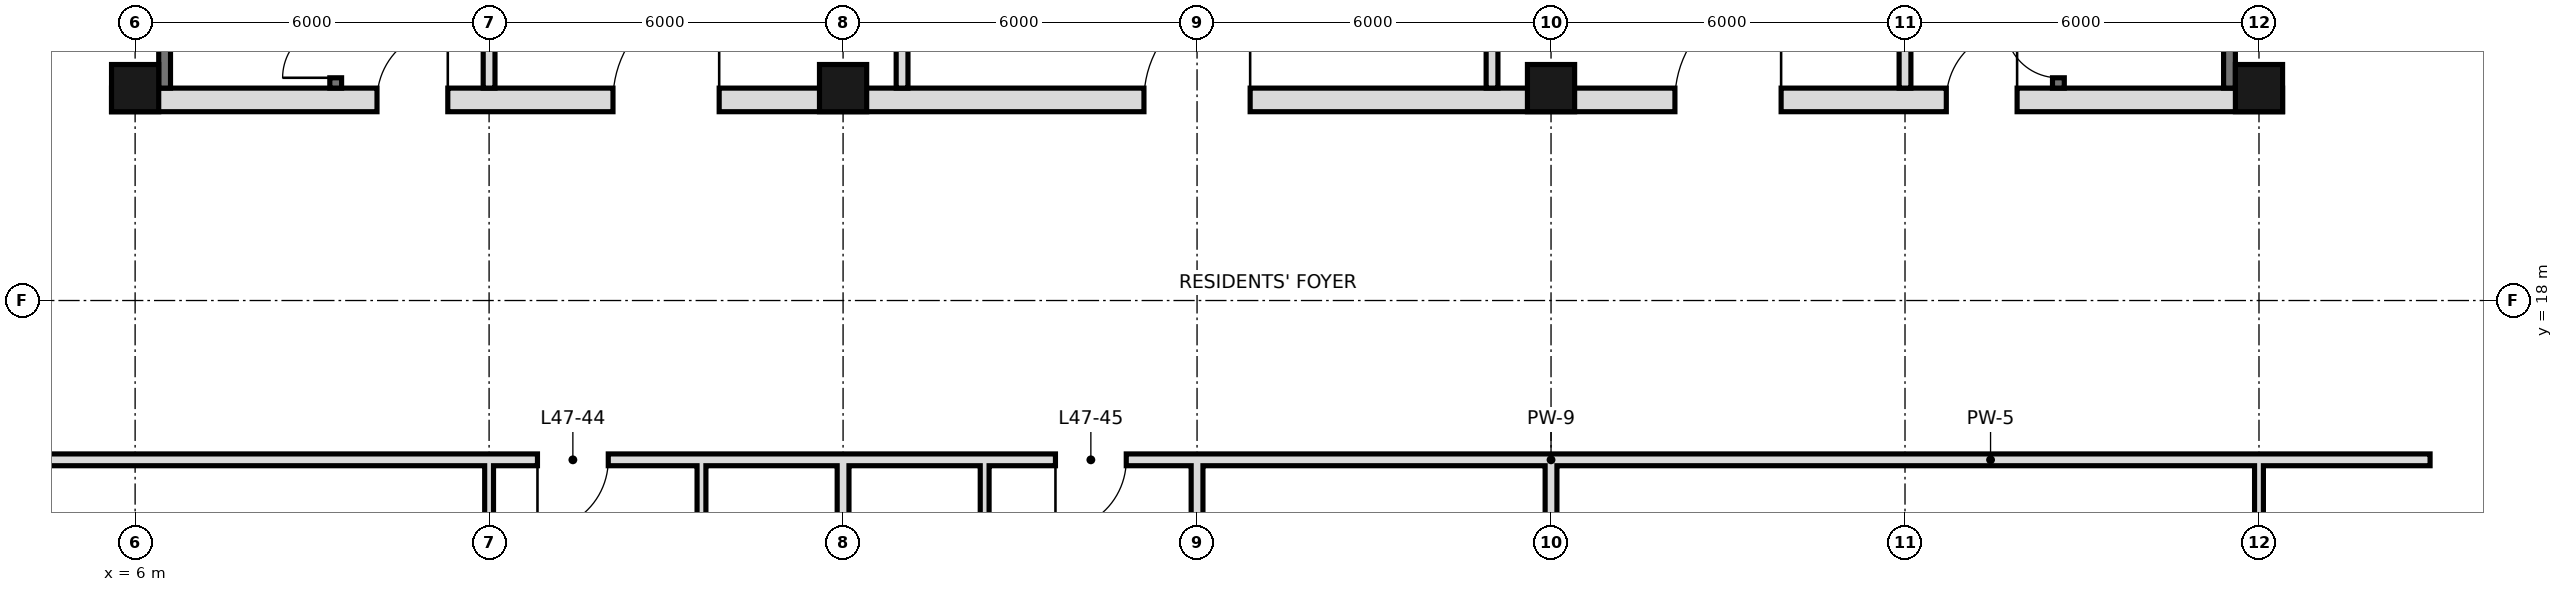
"""IFC4 building model, lengths in metres.
Left out: names, types, materials, properties, quantities, classifications, styles, units other than length and angle.
Written with IfcOpenShell. Run it as: python <this file> out.ifc"""

import sys

from ifc_helpers import new_model, si_unit, direction, frame, frame_2d, origin, origin_2d, place, context, subcontext, project, spatial, rectangle, hollow_rectangle, extrude, element, fill, save


model = new_model("IFC4")
c1 = context("Model", 3, precision=1e-05, world=origin(), true_north=direction((0.0, 1.0)))
c2 = subcontext(c1, "Body", "Model", "MODEL_VIEW")
j1 = project(units=[si_unit("LENGTHUNIT", "METRE"), si_unit("PLANEANGLEUNIT", "RADIAN")], contexts=[c1])
p1 = place(None, origin())
s1 = spatial("IfcSite", under=j1, at=p1, CompositionType="ELEMENT")
p2 = place(p1, origin())
s2 = spatial("IfcBuilding", under=s1, at=p2, CompositionType="ELEMENT")
p3 = place(p2, frame((0.0, 0.0, 202.8)))
s3 = spatial("IfcBuildingStorey", under=s2, at=p3, CompositionType="ELEMENT", Elevation=202.8)
for number, where, z_axis, x_axis in (
    (1, (6.0, 21.6, 0.0), (0.0, 0.0, 1.0), (1.0, 0.0, 0.0)),
    (2, (18.0, 21.6, 0.0), (0.0, 0.0, 1.0), (1.0, 0.0, 0.0)),
    (3, (30.0, 21.6, 0.0), (0.0, 0.0, 1.0), (1.0, 0.0, 0.0)),
    (4, (42.0, 21.6, 0.0), (0.0, 0.0, 1.0), (1.0, 0.0, 0.0)),
):
    element("IfcColumn", number, at=place(p3, frame(where, z_axis=z_axis, x_axis=x_axis)), inside=s3, PredefinedType="COLUMN", context=c2, shape_type="SweptSolid", body=[
        extrude(hollow_rectangle(XDim=0.8, YDim=0.8, WallThickness=0.04, at=origin_2d()), origin(), (0.0, 0.0, 1.0), 3.6),
    ])
p4 = place(p3, frame((12.0, 10.8, 0.0), z_axis=(0.0, 0.0, 1.0), x_axis=(0.0, 1.0, 0.0)))
e5 = element("IfcWall", 5, at=p4, inside=s3, PredefinedType="PARTITIONING", context=c2, shape_type="SweptSolid", body=[
    extrude(rectangle(XDim=4.5, YDim=0.15, at=frame_2d((2.25, 0.0))), origin(), (0.0, 0.0, 1.0), 2.72),
])
p5 = place(p3, frame((15.6, 10.8, 0.0), z_axis=(0.0, 0.0, 1.0), x_axis=(0.0, 1.0, 0.0)))
e6 = element("IfcWall", 6, at=p5, inside=s3, PredefinedType="PARTITIONING", context=c2, shape_type="SweptSolid", body=[
    extrude(rectangle(XDim=4.5, YDim=0.15, at=frame_2d((2.25, 0.0))), origin(), (0.0, 0.0, 1.0), 3.42),
])
p6 = place(p3, frame((18.0, -0.6, 0.0), z_axis=(0.0, 0.0, 1.0), x_axis=(0.0, 1.0, 0.0)))
e7 = element("IfcWall", 7, at=p6, inside=s3, PredefinedType="SOLIDWALL", context=c2, shape_type="SweptSolid", body=[
    extrude(rectangle(XDim=15.9, YDim=0.2, at=frame_2d((7.95, 0.0))), origin(), (0.0, 0.0, 1.0), 2.72),
])
p7 = place(p3, frame((20.4, 10.8, 0.0), z_axis=(0.0, 0.0, 1.0), x_axis=(0.0, 1.0, 0.0)))
e8 = element("IfcWall", 8, at=p7, inside=s3, PredefinedType="PARTITIONING", context=c2, shape_type="SweptSolid", body=[
    extrude(rectangle(XDim=4.5, YDim=0.15, at=frame_2d((2.25, 0.0))), origin(), (0.0, 0.0, 1.0), 3.42),
])
for number, where, z_axis, x_axis in (
    (9, (24.0, 10.8, 0.0), (0.0, 0.0, 1.0), (0.0, 1.0, 0.0)),
    (10, (30.0, 10.8, 0.0), (0.0, 0.0, 1.0), (0.0, 1.0, 0.0)),
):
    element("IfcWall", number, at=place(p3, frame(where, z_axis=z_axis, x_axis=x_axis)), inside=s3, PredefinedType="SOLIDWALL", context=c2, shape_type="SweptSolid", body=[
        extrude(rectangle(XDim=4.5, YDim=0.2, at=frame_2d((2.25, 0.0))), origin(), (0.0, 0.0, 1.0), 2.72),
    ])
p8 = place(p3, frame((42.0, 10.8, 0.0), z_axis=(0.0, 0.0, 1.0), x_axis=(0.0, 1.0, 0.0)))
e11 = element("IfcWall", 11, at=p8, inside=s3, PredefinedType="PARTITIONING", context=c2, shape_type="SweptSolid", body=[
    extrude(rectangle(XDim=4.5, YDim=0.15, at=frame_2d((2.25, 0.0))), origin(), (0.0, 0.0, 1.0), 2.72),
])
p9 = place(p3, frame((3.1, 15.3, 0.0), z_axis=(0.0, 0.0, 1.0), x_axis=(1.0, 0.0, 0.0)))
e12 = element("IfcWall", 12, at=p9, inside=s3, PredefinedType="SOLIDWALL", context=c2, shape_type="SweptSolid", body=[
    extrude(rectangle(XDim=20.9, YDim=0.2, at=frame_2d((10.45, 0.0))), origin(), (0.0, 0.0, 1.0), 2.72),
])
p10 = place(p9, frame((9.72, 0.0, 0.0)))
e13 = element("IfcOpeningElement", 13, at=p10, cuts=e12, PredefinedType="OPENING", context=c2, shape_type="SweptSolid", body=[
    extrude(rectangle(XDim=1.2, YDim=2.4, at=frame_2d((0.6, 1.2))), frame((0.0, 0.11, 0.0), z_axis=(0.0, -1.0, 0.0), x_axis=(1.0, 0.0, 0.0)), (0.0, 0.0, 1.0), 0.22),
])
p11 = place(p9, frame((18.5, 0.0, 0.0)))
e14 = element("IfcOpeningElement", 14, at=p11, cuts=e12, PredefinedType="OPENING", context=c2, shape_type="SweptSolid", body=[
    extrude(rectangle(XDim=1.2, YDim=2.4, at=frame_2d((0.6, 1.2))), frame((0.0, 0.11, 0.0), z_axis=(0.0, -1.0, 0.0), x_axis=(1.0, 0.0, 0.0)), (0.0, 0.0, 1.0), 0.22),
])
p12 = place(p3, frame((30.0, 15.3, 0.0), z_axis=(0.0, 0.0, 1.0), x_axis=(1.0, 0.0, 0.0)))
e15 = element("IfcWall", 15, at=p12, inside=s3, PredefinedType="SOLIDWALL", context=c2, shape_type="SweptSolid", body=[
    extrude(rectangle(XDim=14.9, YDim=0.2, at=frame_2d((7.45, 0.0))), origin(), (0.0, 0.0, 1.0), 2.72),
])
p13 = place(p3, frame((24.0, 15.3, 0.0), z_axis=(0.0, 0.0, 1.0), x_axis=(1.0, 0.0, 0.0)))
e16 = element("IfcWall", 16, at=p13, inside=s3, PredefinedType="SOLIDWALL", context=c2, shape_type="SweptSolid", body=[
    extrude(rectangle(XDim=6.0, YDim=0.2, at=frame_2d((3.0, 0.0))), origin(), (0.0, 0.0, 1.0), 2.72),
])
for number, where, z_axis, x_axis in (
    (17, (6.5, 21.6, 0.0), (0.0, 0.0, 1.0), (0.0, 1.0, 0.0)),
    (18, (41.5, 21.6, 0.0), (0.0, 0.0, 1.0), (0.0, 1.0, 0.0)),
):
    element("IfcWall", number, at=place(p3, frame(where, z_axis=z_axis, x_axis=x_axis)), inside=s3, PredefinedType="SOLIDWALL", context=c2, shape_type="SweptSolid", body=[
        extrude(rectangle(XDim=23.5, YDim=0.2, at=frame_2d((11.75, 0.0))), origin(), (0.0, 0.0, 1.0), 3.42),
    ])
p14 = place(p3, frame((5.6, 21.4, 0.0), z_axis=(0.0, 0.0, 1.0), x_axis=(1.0, 0.0, 0.0)))
e19 = element("IfcWall", 19, at=p14, inside=s3, PredefinedType="SOLIDWALL", context=c2, shape_type="SweptSolid", body=[
    extrude(rectangle(XDim=36.8, YDim=0.4, at=frame_2d((18.4, 0.0))), origin(), (0.0, 0.0, 1.0), 3.42),
])
p15 = place(p14, frame((8.5, 0.0, 0.0)))
e20 = element("IfcOpeningElement", 20, at=p15, cuts=e19, PredefinedType="OPENING", context=c2, shape_type="SweptSolid", body=[
    extrude(rectangle(XDim=1.8, YDim=2.1, at=frame_2d((0.9, 1.05))), frame((0.0, 0.21, 0.0), z_axis=(0.0, -1.0, 0.0), x_axis=(1.0, 0.0, 0.0)), (0.0, 0.0, 1.0), 0.42),
])
p16 = place(p14, frame((17.5, 0.0, 0.0)))
e21 = element("IfcOpeningElement", 21, at=p16, cuts=e19, PredefinedType="OPENING", context=c2, shape_type="SweptSolid", body=[
    extrude(rectangle(XDim=1.8, YDim=2.1, at=frame_2d((0.9, 1.05))), frame((0.0, 0.21, 0.0), z_axis=(0.0, -1.0, 0.0), x_axis=(1.0, 0.0, 0.0)), (0.0, 0.0, 1.0), 0.42),
])
p17 = place(p14, frame((26.5, 0.0, 0.0)))
e22 = element("IfcOpeningElement", 22, at=p17, cuts=e19, PredefinedType="OPENING", context=c2, shape_type="SweptSolid", body=[
    extrude(rectangle(XDim=1.8, YDim=2.1, at=frame_2d((0.9, 1.05))), frame((0.0, 0.21, 0.0), z_axis=(0.0, -1.0, 0.0), x_axis=(1.0, 0.0, 0.0)), (0.0, 0.0, 1.0), 0.42),
])
p18 = place(p14, frame((4.5, 0.0, 0.0)))
e23 = element("IfcOpeningElement", 23, at=p18, cuts=e19, PredefinedType="OPENING", context=c2, shape_type="SweptSolid", body=[
    extrude(rectangle(XDim=1.2, YDim=2.1, at=frame_2d((0.6, 1.05))), frame((0.0, 0.21, 0.0), z_axis=(0.0, -1.0, 0.0), x_axis=(1.0, 0.0, 0.0)), (0.0, 0.0, 1.0), 0.42),
])
p19 = place(p14, frame((31.1, 0.0, 0.0)))
e24 = element("IfcOpeningElement", 24, at=p19, cuts=e19, PredefinedType="OPENING", context=c2, shape_type="SweptSolid", body=[
    extrude(rectangle(XDim=1.2, YDim=2.1, at=frame_2d((0.6, 1.05))), frame((0.0, 0.21, 0.0), z_axis=(0.0, -1.0, 0.0), x_axis=(1.0, 0.0, 0.0)), (0.0, 0.0, 1.0), 0.42),
])
p20 = place(p3, frame((19.0, 21.6, 0.0), z_axis=(0.0, 0.0, 1.0), x_axis=(0.0, 1.0, 0.0)))
e25 = element("IfcWall", 25, at=p20, inside=s3, PredefinedType="PARTITIONING", context=c2, shape_type="SweptSolid", body=[
    extrude(rectangle(XDim=6.0, YDim=0.2, at=frame_2d((3.0, 0.0))), origin(), (0.0, 0.0, 1.0), 3.42),
])
p21 = place(p20, frame((2.1, 0.0, 0.0)))
e26 = element("IfcOpeningElement", 26, at=p21, cuts=e25, PredefinedType="OPENING", context=c2, shape_type="SweptSolid", body=[
    extrude(rectangle(XDim=1.8, YDim=2.1, at=frame_2d((0.9, 1.05))), frame((0.0, 0.11, 0.0), z_axis=(0.0, -1.0, 0.0), x_axis=(1.0, 0.0, 0.0)), (0.0, 0.0, 1.0), 0.22),
])
p22 = place(p3, frame((29.0, 21.6, 0.0), z_axis=(0.0, 0.0, 1.0), x_axis=(0.0, 1.0, 0.0)))
e27 = element("IfcWall", 27, at=p22, inside=s3, PredefinedType="PARTITIONING", context=c2, shape_type="SweptSolid", body=[
    extrude(rectangle(XDim=6.0, YDim=0.2, at=frame_2d((3.0, 0.0))), origin(), (0.0, 0.0, 1.0), 3.42),
])
p23 = place(p22, frame((2.1, 0.0, 0.0)))
e28 = element("IfcOpeningElement", 28, at=p23, cuts=e27, PredefinedType="OPENING", context=c2, shape_type="SweptSolid", body=[
    extrude(rectangle(XDim=1.8, YDim=2.1, at=frame_2d((0.9, 1.05))), frame((0.0, 0.11, 0.0), z_axis=(0.0, -1.0, 0.0), x_axis=(1.0, 0.0, 0.0)), (0.0, 0.0, 1.0), 0.22),
])
for number, where, z_axis, x_axis in (
    (29, (12.0, 21.6, 0.0), (0.0, 0.0, 1.0), (0.0, 1.0, 0.0)),
    (30, (36.0, 21.6, 0.0), (0.0, 0.0, 1.0), (0.0, 1.0, 0.0)),
):
    element("IfcWall", number, at=place(p3, frame(where, z_axis=z_axis, x_axis=x_axis)), inside=s3, PredefinedType="PARTITIONING", context=c2, shape_type="SweptSolid", body=[
        extrude(rectangle(XDim=6.1, YDim=0.2, at=frame_2d((3.05, 0.0))), origin(), (0.0, 0.0, 1.0), 3.42),
    ])
p24 = place(p3, frame((38.6, 21.6, 0.0), z_axis=(0.0, 0.0, 1.0), x_axis=(0.0, 1.0, 0.0)))
e31 = element("IfcWall", 31, at=p24, inside=s3, PredefinedType="SOLIDWALL", context=c2, shape_type="SweptSolid", body=[
    extrude(rectangle(XDim=23.4, YDim=0.2, at=frame_2d((11.7, 0.0))), origin(), (0.0, 0.0, 1.0), 3.42),
])
p25 = place(p24, frame((7.0, 0.0, 0.0)))
e32 = element("IfcOpeningElement", 32, at=p25, cuts=e31, PredefinedType="OPENING", context=c2, shape_type="SweptSolid", body=[
    extrude(rectangle(XDim=1.1, YDim=2.1, at=frame_2d((0.55, 1.05))), frame((0.0, 0.11, 0.0), z_axis=(0.0, -1.0, 0.0), x_axis=(1.0, 0.0, 0.0)), (0.0, 0.0, 1.0), 0.22),
])
p26 = place(p24, frame((10.1, 0.0, 0.0)))
e33 = element("IfcOpeningElement", 33, at=p26, cuts=e31, PredefinedType="OPENING", context=c2, shape_type="SweptSolid", body=[
    extrude(rectangle(XDim=1.1, YDim=2.1, at=frame_2d((0.55, 1.05))), frame((0.0, 0.11, 0.0), z_axis=(0.0, -1.0, 0.0), x_axis=(1.0, 0.0, 0.0)), (0.0, 0.0, 1.0), 0.22),
])
p27 = place(p24, frame((13.2, 0.0, 0.0)))
e34 = element("IfcOpeningElement", 34, at=p27, cuts=e31, PredefinedType="OPENING", context=c2, shape_type="SweptSolid", body=[
    extrude(rectangle(XDim=1.1, YDim=2.1, at=frame_2d((0.55, 1.05))), frame((0.0, 0.11, 0.0), z_axis=(0.0, -1.0, 0.0), x_axis=(1.0, 0.0, 0.0)), (0.0, 0.0, 1.0), 0.22),
])
p28 = place(p24, frame((22.1, 0.0, 0.0)))
e35 = element("IfcOpeningElement", 35, at=p28, cuts=e31, PredefinedType="OPENING", context=c2, shape_type="SweptSolid", body=[
    extrude(rectangle(XDim=1.0, YDim=2.1, at=frame_2d((0.5, 1.05))), frame((0.0, 0.11, 0.0), z_axis=(0.0, -1.0, 0.0), x_axis=(1.0, 0.0, 0.0)), (0.0, 0.0, 1.0), 0.22),
])
p29 = place(p24, frame((0.175, 0.0, 0.0)))
e36 = element("IfcOpeningElement", 36, at=p29, cuts=e31, PredefinedType="OPENING", context=c2, shape_type="SweptSolid", body=[
    extrude(rectangle(XDim=0.9, YDim=2.1, at=frame_2d((0.45, 1.05))), frame((0.0, 0.11, 0.0), z_axis=(0.0, -1.0, 0.0), x_axis=(1.0, 0.0, 0.0)), (0.0, 0.0, 1.0), 0.22),
])
p30 = place(p3, frame((9.4, 21.6, 0.0), z_axis=(0.0, 0.0, 1.0), x_axis=(0.0, 1.0, 0.0)))
e37 = element("IfcWall", 37, at=p30, inside=s3, PredefinedType="SOLIDWALL", context=c2, shape_type="SweptSolid", body=[
    extrude(rectangle(XDim=23.4, YDim=0.2, at=frame_2d((11.7, 0.0))), origin(), (0.0, 0.0, 1.0), 3.42),
])
p31 = place(p30, frame((7.8, 0.0, 0.0)))
e38 = element("IfcOpeningElement", 38, at=p31, cuts=e37, PredefinedType="OPENING", context=c2, shape_type="SweptSolid", body=[
    extrude(rectangle(XDim=1.0, YDim=2.1, at=frame_2d((0.5, 1.05))), frame((0.0, 0.11, 0.0), z_axis=(0.0, -1.0, 0.0), x_axis=(1.0, 0.0, 0.0)), (0.0, 0.0, 1.0), 0.22),
])
p32 = place(p30, frame((12.45, 0.0, 0.0)))
e39 = element("IfcOpeningElement", 39, at=p32, cuts=e37, PredefinedType="OPENING", context=c2, shape_type="SweptSolid", body=[
    extrude(rectangle(XDim=1.0, YDim=2.1, at=frame_2d((0.5, 1.05))), frame((0.0, 0.11, 0.0), z_axis=(0.0, -1.0, 0.0), x_axis=(1.0, 0.0, 0.0)), (0.0, 0.0, 1.0), 0.22),
])
p33 = place(p30, frame((22.1, 0.0, 0.0)))
e40 = element("IfcOpeningElement", 40, at=p33, cuts=e37, PredefinedType="OPENING", context=c2, shape_type="SweptSolid", body=[
    extrude(rectangle(XDim=1.0, YDim=2.1, at=frame_2d((0.5, 1.05))), frame((0.0, 0.11, 0.0), z_axis=(0.0, -1.0, 0.0), x_axis=(1.0, 0.0, 0.0)), (0.0, 0.0, 1.0), 0.22),
])
p34 = place(p30, frame((0.175, 0.0, 0.0)))
e41 = element("IfcOpeningElement", 41, at=p34, cuts=e37, PredefinedType="OPENING", context=c2, shape_type="SweptSolid", body=[
    extrude(rectangle(XDim=0.9, YDim=2.1, at=frame_2d((0.45, 1.05))), frame((0.0, 0.11, 0.0), z_axis=(0.0, -1.0, 0.0), x_axis=(1.0, 0.0, 0.0)), (0.0, 0.0, 1.0), 0.22),
])
p35 = place(p10, frame((1.2, 0.0, 0.0), z_axis=(0.0, 0.0, 1.0), x_axis=(-1.0, 0.0, 0.0)))
e42 = element("IfcDoor", 42, at=p35, inside=s3, OperationType="SINGLE_SWING_RIGHT", PredefinedType="DOOR", context=c2, shape_type="SweptSolid", body=[
    extrude(rectangle(XDim=1.2, YDim=2.4, at=frame_2d((0.6, 1.2))), frame((0.0, 0.025, 0.0), z_axis=(0.0, -1.0, 0.0), x_axis=(1.0, 0.0, 0.0)), (0.0, 0.0, 1.0), 0.05),
])
fill(e13, e42)
p36 = place(p11, frame((1.2, 0.0, 0.0), z_axis=(0.0, 0.0, 1.0), x_axis=(-1.0, 0.0, 0.0)))
e43 = element("IfcDoor", 43, at=p36, inside=s3, OperationType="SINGLE_SWING_RIGHT", PredefinedType="DOOR", context=c2, shape_type="SweptSolid", body=[
    extrude(rectangle(XDim=1.2, YDim=2.4, at=frame_2d((0.6, 1.2))), frame((0.0, 0.025, 0.0), z_axis=(0.0, -1.0, 0.0), x_axis=(1.0, 0.0, 0.0)), (0.0, 0.0, 1.0), 0.05),
])
fill(e14, e43)
p37 = place(p15, frame((1.8, 0.0, 0.0), z_axis=(0.0, 0.0, 1.0), x_axis=(-1.0, 0.0, 0.0)))
e44 = element("IfcDoor", 44, at=p37, inside=s3, OperationType="SINGLE_SWING_LEFT", PredefinedType="DOOR", context=c2, shape_type="SweptSolid", body=[
    extrude(rectangle(XDim=1.8, YDim=2.1, at=frame_2d((0.9, 1.05))), frame((0.0, 0.025, 0.0), z_axis=(0.0, -1.0, 0.0), x_axis=(1.0, 0.0, 0.0)), (0.0, 0.0, 1.0), 0.05),
])
fill(e20, e44)
p38 = place(p16, frame((1.8, 0.0, 0.0), z_axis=(0.0, 0.0, 1.0), x_axis=(-1.0, 0.0, 0.0)))
e45 = element("IfcDoor", 45, at=p38, inside=s3, OperationType="SINGLE_SWING_LEFT", PredefinedType="DOOR", context=c2, shape_type="SweptSolid", body=[
    extrude(rectangle(XDim=1.8, YDim=2.1, at=frame_2d((0.9, 1.05))), frame((0.0, 0.025, 0.0), z_axis=(0.0, -1.0, 0.0), x_axis=(1.0, 0.0, 0.0)), (0.0, 0.0, 1.0), 0.05),
])
fill(e21, e45)
p39 = place(p17, frame((1.8, 0.0, 0.0), z_axis=(0.0, 0.0, 1.0), x_axis=(-1.0, 0.0, 0.0)))
e46 = element("IfcDoor", 46, at=p39, inside=s3, OperationType="SINGLE_SWING_LEFT", PredefinedType="DOOR", context=c2, shape_type="SweptSolid", body=[
    extrude(rectangle(XDim=1.8, YDim=2.1, at=frame_2d((0.9, 1.05))), frame((0.0, 0.025, 0.0), z_axis=(0.0, -1.0, 0.0), x_axis=(1.0, 0.0, 0.0)), (0.0, 0.0, 1.0), 0.05),
])
fill(e22, e46)
p40 = place(p18, frame((1.2, 0.0, 0.0), z_axis=(0.0, 0.0, 1.0), x_axis=(-1.0, 0.0, 0.0)))
e47 = element("IfcDoor", 47, at=p40, inside=s3, OperationType="SINGLE_SWING_LEFT", PredefinedType="DOOR", context=c2, shape_type="SweptSolid", body=[
    extrude(rectangle(XDim=1.2, YDim=2.1, at=frame_2d((0.6, 1.05))), frame((0.0, 0.025, 0.0), z_axis=(0.0, -1.0, 0.0), x_axis=(1.0, 0.0, 0.0)), (0.0, 0.0, 1.0), 0.05),
])
fill(e23, e47)
p41 = place(p19, frame((1.2, 0.0, 0.0), z_axis=(0.0, 0.0, 1.0), x_axis=(-1.0, 0.0, 0.0)))
e48 = element("IfcDoor", 48, at=p41, inside=s3, OperationType="SINGLE_SWING_LEFT", PredefinedType="DOOR", context=c2, shape_type="SweptSolid", body=[
    extrude(rectangle(XDim=1.2, YDim=2.1, at=frame_2d((0.6, 1.05))), frame((0.0, 0.025, 0.0), z_axis=(0.0, -1.0, 0.0), x_axis=(1.0, 0.0, 0.0)), (0.0, 0.0, 1.0), 0.05),
])
fill(e24, e48)
p42 = place(p34, origin())
e49 = element("IfcDoor", 49, at=p42, inside=s3, OperationType="SINGLE_SWING_LEFT", PredefinedType="DOOR", context=c2, shape_type="SweptSolid", body=[
    extrude(rectangle(XDim=0.9, YDim=2.1, at=frame_2d((0.45, 1.05))), frame((0.0, 0.025, 0.0), z_axis=(0.0, -1.0, 0.0), x_axis=(1.0, 0.0, 0.0)), (0.0, 0.0, 1.0), 0.05),
])
fill(e41, e49)
p43 = place(p29, frame((0.9, 0.0, 0.0), z_axis=(0.0, 0.0, 1.0), x_axis=(-1.0, 0.0, 0.0)))
e50 = element("IfcDoor", 50, at=p43, inside=s3, OperationType="SINGLE_SWING_LEFT", PredefinedType="DOOR", context=c2, shape_type="SweptSolid", body=[
    extrude(rectangle(XDim=0.9, YDim=2.1, at=frame_2d((0.45, 1.05))), frame((0.0, 0.025, 0.0), z_axis=(0.0, -1.0, 0.0), x_axis=(1.0, 0.0, 0.0)), (0.0, 0.0, 1.0), 0.05),
])
fill(e36, e50)
save(model, sys.argv[1])
